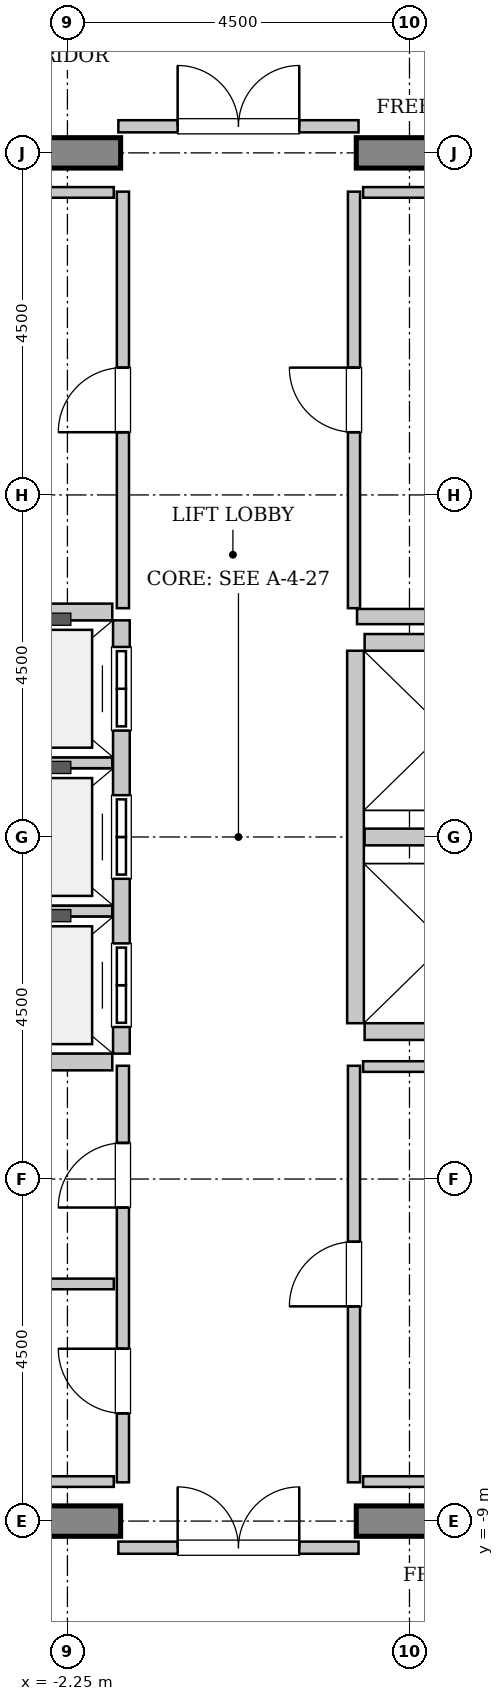
"""IFC4 building model, lengths in metres.
Left out: names, types, materials, properties, quantities, classifications, styles, units other than length and angle.
Written with IfcOpenShell. Run it as: python <this file> out.ifc"""

import sys

from ifc_helpers import new_model, si_unit, direction, frame, frame_2d, origin, place, context, subcontext, project, spatial, rectangle, extrude, source, transform, mapped, element, fill, save


model = new_model("IFC4")
c1 = context("Model", 3, precision=1e-05, world=origin(), true_north=direction((0.0, 1.0)))
c2 = subcontext(c1, "Body", "Model", "MODEL_VIEW")
j1 = project(units=[si_unit("LENGTHUNIT", "METRE"), si_unit("PLANEANGLEUNIT", "RADIAN")], contexts=[c1])
p1 = place(None, origin())
s1 = spatial("IfcSite", under=j1, at=p1, CompositionType="ELEMENT")
p2 = place(p1, origin())
s2 = spatial("IfcBuilding", under=s1, at=p2, CompositionType="ELEMENT")
p3 = place(p2, frame((0.0, 0.0, 322.4)))
s3 = spatial("IfcBuildingStorey", under=s2, at=p3, CompositionType="ELEMENT", Elevation=322.4)
m1 = source(origin(), c2, "Body", "SweptSolid", [
    extrude(rectangle(XDim=9.9, YDim=0.4, at=frame_2d((4.95, 0.0))), origin(), (0.0, 0.0, 1.0), 3.8),
])
for number, where, z_axis, x_axis in (
    (1, (-11.45, 9.0, 0.0), (0.0, 0.0, 1.0), (1.0, 0.0, 0.0)),
    (2, (1.55, 9.0, 0.0), (0.0, 0.0, 1.0), (1.0, 0.0, 0.0)),
    (3, (-11.45, -9.0, 0.0), (0.0, 0.0, 1.0), (1.0, 0.0, 0.0)),
    (4, (1.55, -9.0, 0.0), (0.0, 0.0, 1.0), (1.0, 0.0, 0.0)),
):
    element("IfcWall", number, at=place(p3, frame(where, z_axis=z_axis, x_axis=x_axis)), inside=s3, PredefinedType="SHEAR", context=c2, shape_type="MappedRepresentation", body=[
        mapped(m1, transform((0.0, 0.0, 0.0), x_axis=(1.0, 0.0, 0.0), y_axis=(0.0, 1.0, 0.0), z_axis=(0.0, 0.0, 1.0), scale=1.0)),
    ])
m2 = source(origin(), c2, "Body", "SweptSolid", [
    extrude(rectangle(XDim=5.7, YDim=0.22, at=frame_2d((2.85, 0.0))), origin(), (0.0, 0.0, 1.0), 3.535),
])
p4 = place(p3, frame((-1.54, -2.85, 0.0), z_axis=(0.0, 0.0, 1.0), x_axis=(0.0, 1.0, 0.0)))
e5 = element("IfcWall", 5, at=p4, inside=s3, PredefinedType="SOLIDWALL", context=c2, shape_type="MappedRepresentation", body=[
    mapped(m2, transform((0.0, 0.0, 0.0), x_axis=(1.0, 0.0, 0.0), y_axis=(0.0, 1.0, 0.0), z_axis=(0.0, 0.0, 1.0), scale=1.0)),
])
p5 = place(p4, frame((0.35, 0.0, 0.0)))
e6 = element("IfcOpeningElement", 6, at=p5, cuts=e5, PredefinedType="OPENING", context=c2, shape_type="SweptSolid", body=[
    extrude(rectangle(XDim=1.1, YDim=2.2, at=frame_2d((0.55, 1.1))), frame((0.0, 0.12, 0.0), z_axis=(0.0, -1.0, 0.0), x_axis=(1.0, 0.0, 0.0)), (0.0, 0.0, 1.0), 0.24),
])
p6 = place(p4, frame((2.3, 0.0, 0.0)))
e7 = element("IfcOpeningElement", 7, at=p6, cuts=e5, PredefinedType="OPENING", context=c2, shape_type="SweptSolid", body=[
    extrude(rectangle(XDim=1.1, YDim=2.2, at=frame_2d((0.55, 1.1))), frame((0.0, 0.12, 0.0), z_axis=(0.0, -1.0, 0.0), x_axis=(1.0, 0.0, 0.0)), (0.0, 0.0, 1.0), 0.24),
])
p7 = place(p4, frame((4.25, 0.0, 0.0)))
e8 = element("IfcOpeningElement", 8, at=p7, cuts=e5, PredefinedType="OPENING", context=c2, shape_type="SweptSolid", body=[
    extrude(rectangle(XDim=1.1, YDim=2.2, at=frame_2d((0.55, 1.1))), frame((0.0, 0.12, 0.0), z_axis=(0.0, -1.0, 0.0), x_axis=(1.0, 0.0, 0.0)), (0.0, 0.0, 1.0), 0.24),
])
m3 = source(origin(), c2, "Body", "SweptSolid", [
    extrude(rectangle(XDim=2.13, YDim=0.22, at=frame_2d((1.065, 0.0))), origin(), (0.0, 0.0, 1.0), 3.535),
])
p8 = place(p3, frame((-3.79, -2.96, 0.0), z_axis=(0.0, 0.0, 1.0), x_axis=(1.0, 0.0, 0.0)))
e9 = element("IfcWall", 9, at=p8, inside=s3, PredefinedType="SOLIDWALL", context=c2, shape_type="MappedRepresentation", body=[
    mapped(m3, transform((0.0, 0.0, 0.0), x_axis=(1.0, 0.0, 0.0), y_axis=(0.0, 1.0, 0.0), z_axis=(0.0, 0.0, 1.0), scale=1.0)),
])
m4 = source(origin(), c2, "Body", "SweptSolid", [
    extrude(rectangle(XDim=2.13, YDim=0.14, at=frame_2d((1.065, 0.0))), origin(), (0.0, 0.0, 1.0), 3.535),
])
for number, where, z_axis, x_axis in (
    (10, (-3.79, -0.975, 0.0), (0.0, 0.0, 1.0), (1.0, 0.0, 0.0)),
    (11, (-3.79, 0.975, 0.0), (0.0, 0.0, 1.0), (1.0, 0.0, 0.0)),
):
    element("IfcWall", number, at=place(p3, frame(where, z_axis=z_axis, x_axis=x_axis)), inside=s3, PredefinedType="PARTITIONING", context=c2, shape_type="MappedRepresentation", body=[
        mapped(m4, transform((0.0, 0.0, 0.0), x_axis=(1.0, 0.0, 0.0), y_axis=(0.0, 1.0, 0.0), z_axis=(0.0, 0.0, 1.0), scale=1.0)),
    ])
p9 = place(p3, frame((-1.66, 2.96, 0.0), z_axis=(0.0, 0.0, 1.0), x_axis=(-1.0, 0.0, 0.0)))
e12 = element("IfcWall", 12, at=p9, inside=s3, PredefinedType="SOLIDWALL", context=c2, shape_type="MappedRepresentation", body=[
    mapped(m3, transform((0.0, 0.0, 0.0), x_axis=(1.0, 0.0, 0.0), y_axis=(0.0, 1.0, 0.0), z_axis=(0.0, 0.0, 1.0), scale=1.0)),
])
m5 = source(origin(), c2, "Body", "SweptSolid", [
    extrude(rectangle(XDim=4.9, YDim=0.22, at=frame_2d((2.45, 0.0))), origin(), (0.0, 0.0, 1.0), 3.535),
])
p10 = place(p3, frame((1.54, 2.45, 0.0), z_axis=(0.0, 0.0, 1.0), x_axis=(0.0, -1.0, 0.0)))
e13 = element("IfcWall", 13, at=p10, inside=s3, PredefinedType="SOLIDWALL", context=c2, shape_type="MappedRepresentation", body=[
    mapped(m5, transform((0.0, 0.0, 0.0), x_axis=(1.0, 0.0, 0.0), y_axis=(0.0, 1.0, 0.0), z_axis=(0.0, 0.0, 1.0), scale=1.0)),
])
for number, where, z_axis, x_axis in (
    (14, (1.66, -2.56, 0.0), (0.0, 0.0, 1.0), (1.0, 0.0, 0.0)),
    (15, (1.66, 0.0, 0.0), (0.0, 0.0, 1.0), (1.0, 0.0, 0.0)),
    (16, (3.79, 2.56, 0.0), (0.0, 0.0, 1.0), (-1.0, 0.0, 0.0)),
):
    element("IfcWall", number, at=place(p3, frame(where, z_axis=z_axis, x_axis=x_axis)), inside=s3, PredefinedType="SOLIDWALL", context=c2, shape_type="MappedRepresentation", body=[
        mapped(m3, transform((0.0, 0.0, 0.0), x_axis=(1.0, 0.0, 0.0), y_axis=(0.0, 1.0, 0.0), z_axis=(0.0, 0.0, 1.0), scale=1.0)),
    ])
m6 = source(origin(), c2, "Body", "SweptSolid", [
    extrude(rectangle(XDim=2.52, YDim=0.2, at=frame_2d((1.26, 0.0))), origin(), (0.0, 0.0, 1.0), 3.535),
])
p11 = place(p3, frame((1.56, 2.9, 0.0), z_axis=(0.0, 0.0, 1.0), x_axis=(1.0, 0.0, 0.0)))
e17 = element("IfcWall", 17, at=p11, inside=s3, PredefinedType="PARTITIONING", context=c2, shape_type="MappedRepresentation", body=[
    mapped(m6, transform((0.0, 0.0, 0.0), x_axis=(1.0, 0.0, 0.0), y_axis=(0.0, 1.0, 0.0), z_axis=(0.0, 0.0, 1.0), scale=1.0)),
])
m7 = source(origin(), c2, "Body", "SweptSolid", [
    extrude(rectangle(XDim=3.16, YDim=0.16, at=frame_2d((1.58, 0.0))), origin(), (0.0, 0.0, 1.0), 2.625),
])
p12 = place(p3, frame((-1.58, 9.35, 0.0), z_axis=(0.0, 0.0, 1.0), x_axis=(1.0, 0.0, 0.0)))
e18 = element("IfcWall", 18, at=p12, inside=s3, PredefinedType="PARTITIONING", context=c2, shape_type="MappedRepresentation", body=[
    mapped(m7, transform((0.0, 0.0, 0.0), x_axis=(1.0, 0.0, 0.0), y_axis=(0.0, 1.0, 0.0), z_axis=(0.0, 0.0, 1.0), scale=1.0)),
])
p13 = place(p12, frame((0.78, 0.0, 0.0)))
e19 = element("IfcOpeningElement", 19, at=p13, cuts=e18, PredefinedType="OPENING", context=c2, shape_type="SweptSolid", body=[
    extrude(rectangle(XDim=1.6, YDim=2.3, at=frame_2d((0.8, 1.15))), frame((0.0, 0.09, 0.0), z_axis=(0.0, -1.0, 0.0), x_axis=(1.0, 0.0, 0.0)), (0.0, 0.0, 1.0), 0.18),
])
p14 = place(p3, frame((-1.58, -9.35, 0.0), z_axis=(0.0, 0.0, 1.0), x_axis=(1.0, 0.0, 0.0)))
e20 = element("IfcWall", 20, at=p14, inside=s3, PredefinedType="PARTITIONING", context=c2, shape_type="MappedRepresentation", body=[
    mapped(m7, transform((0.0, 0.0, 0.0), x_axis=(1.0, 0.0, 0.0), y_axis=(0.0, 1.0, 0.0), z_axis=(0.0, 0.0, 1.0), scale=1.0)),
])
p15 = place(p14, frame((0.78, 0.0, 0.0)))
e21 = element("IfcOpeningElement", 21, at=p15, cuts=e20, PredefinedType="OPENING", context=c2, shape_type="SweptSolid", body=[
    extrude(rectangle(XDim=1.6, YDim=2.3, at=frame_2d((0.8, 1.15))), frame((0.0, 0.09, 0.0), z_axis=(0.0, -1.0, 0.0), x_axis=(1.0, 0.0, 0.0)), (0.0, 0.0, 1.0), 0.18),
])
m8 = source(origin(), c2, "Body", "SweptSolid", [
    extrude(rectangle(XDim=5.48, YDim=0.16, at=frame_2d((2.74, 0.0))), origin(), (0.0, 0.0, 1.0), 3.535),
])
p16 = place(p3, frame((-1.52, 3.01, 0.0), z_axis=(0.0, 0.0, 1.0), x_axis=(0.0, 1.0, 0.0)))
e22 = element("IfcWall", 22, at=p16, inside=s3, PredefinedType="PARTITIONING", context=c2, shape_type="MappedRepresentation", body=[
    mapped(m8, transform((0.0, 0.0, 0.0), x_axis=(1.0, 0.0, 0.0), y_axis=(0.0, 1.0, 0.0), z_axis=(0.0, 0.0, 1.0), scale=1.0)),
])
p17 = place(p16, frame((2.315, 0.0, 0.0)))
e23 = element("IfcOpeningElement", 23, at=p17, cuts=e22, PredefinedType="OPENING", context=c2, shape_type="SweptSolid", body=[
    extrude(rectangle(XDim=0.85, YDim=2.1, at=frame_2d((0.425, 1.05))), frame((0.0, 0.09, 0.0), z_axis=(0.0, -1.0, 0.0), x_axis=(1.0, 0.0, 0.0)), (0.0, 0.0, 1.0), 0.18),
])
m9 = source(origin(), c2, "Body", "SweptSolid", [
    extrude(rectangle(XDim=3.15, YDim=0.14, at=frame_2d((1.575, 0.0))), origin(), (0.0, 0.0, 1.0), 3.535),
])
p18 = place(p3, frame((-4.79, 8.48, 0.0), z_axis=(0.0, 0.0, 1.0), x_axis=(1.0, 0.0, 0.0)))
e24 = element("IfcWall", 24, at=p18, inside=s3, PredefinedType="PARTITIONING", context=c2, shape_type="MappedRepresentation", body=[
    mapped(m9, transform((0.0, 0.0, 0.0), x_axis=(1.0, 0.0, 0.0), y_axis=(0.0, 1.0, 0.0), z_axis=(0.0, 0.0, 1.0), scale=1.0)),
])
p19 = place(p3, frame((-1.52, -8.49, 0.0), z_axis=(0.0, 0.0, 1.0), x_axis=(0.0, 1.0, 0.0)))
e25 = element("IfcWall", 25, at=p19, inside=s3, PredefinedType="PARTITIONING", context=c2, shape_type="MappedRepresentation", body=[
    mapped(m8, transform((0.0, 0.0, 0.0), x_axis=(1.0, 0.0, 0.0), y_axis=(0.0, 1.0, 0.0), z_axis=(0.0, 0.0, 1.0), scale=1.0)),
])
p20 = place(p19, frame((0.907, 0.0, 0.0)))
e26 = element("IfcOpeningElement", 26, at=p20, cuts=e25, PredefinedType="OPENING", context=c2, shape_type="SweptSolid", body=[
    extrude(rectangle(XDim=0.85, YDim=2.1, at=frame_2d((0.425, 1.05))), frame((0.0, 0.09, 0.0), z_axis=(0.0, -1.0, 0.0), x_axis=(1.0, 0.0, 0.0)), (0.0, 0.0, 1.0), 0.18),
])
p21 = place(p19, frame((3.615, 0.0, 0.0)))
e27 = element("IfcOpeningElement", 27, at=p21, cuts=e25, PredefinedType="OPENING", context=c2, shape_type="SweptSolid", body=[
    extrude(rectangle(XDim=0.85, YDim=2.1, at=frame_2d((0.425, 1.05))), frame((0.0, 0.09, 0.0), z_axis=(0.0, -1.0, 0.0), x_axis=(1.0, 0.0, 0.0)), (0.0, 0.0, 1.0), 0.18),
])
m10 = source(origin(), c2, "Body", "SweptSolid", [
    extrude(rectangle(XDim=5.55, YDim=0.14, at=frame_2d((2.775, 0.0))), origin(), (0.0, 0.0, 1.0), 3.535),
])
p22 = place(p3, frame((-7.19, -5.88, 0.0), z_axis=(0.0, 0.0, 1.0), x_axis=(1.0, 0.0, 0.0)))
e28 = element("IfcWall", 28, at=p22, inside=s3, PredefinedType="PARTITIONING", context=c2, shape_type="MappedRepresentation", body=[
    mapped(m10, transform((0.0, 0.0, 0.0), x_axis=(1.0, 0.0, 0.0), y_axis=(0.0, 1.0, 0.0), z_axis=(0.0, 0.0, 1.0), scale=1.0)),
])
p23 = place(p3, frame((1.52, 3.01, 0.0), z_axis=(0.0, 0.0, 1.0), x_axis=(0.0, 1.0, 0.0)))
e29 = element("IfcWall", 29, at=p23, inside=s3, PredefinedType="PARTITIONING", context=c2, shape_type="MappedRepresentation", body=[
    mapped(m8, transform((0.0, 0.0, 0.0), x_axis=(1.0, 0.0, 0.0), y_axis=(0.0, 1.0, 0.0), z_axis=(0.0, 0.0, 1.0), scale=1.0)),
])
p24 = place(p23, frame((2.315, 0.0, 0.0)))
e30 = element("IfcOpeningElement", 30, at=p24, cuts=e29, PredefinedType="OPENING", context=c2, shape_type="SweptSolid", body=[
    extrude(rectangle(XDim=0.85, YDim=2.1, at=frame_2d((0.425, 1.05))), frame((0.0, 0.09, 0.0), z_axis=(0.0, -1.0, 0.0), x_axis=(1.0, 0.0, 0.0)), (0.0, 0.0, 1.0), 0.18),
])
for number, where, z_axis, x_axis in (
    (31, (1.64, 8.48, 0.0), (0.0, 0.0, 1.0), (1.0, 0.0, 0.0)),
    (32, (-4.79, -8.48, 0.0), (0.0, 0.0, 1.0), (1.0, 0.0, 0.0)),
):
    element("IfcWall", number, at=place(p3, frame(where, z_axis=z_axis, x_axis=x_axis)), inside=s3, PredefinedType="PARTITIONING", context=c2, shape_type="MappedRepresentation", body=[
        mapped(m9, transform((0.0, 0.0, 0.0), x_axis=(1.0, 0.0, 0.0), y_axis=(0.0, 1.0, 0.0), z_axis=(0.0, 0.0, 1.0), scale=1.0)),
    ])
p25 = place(p3, frame((1.52, -8.49, 0.0), z_axis=(0.0, 0.0, 1.0), x_axis=(0.0, 1.0, 0.0)))
e33 = element("IfcWall", 33, at=p25, inside=s3, PredefinedType="PARTITIONING", context=c2, shape_type="MappedRepresentation", body=[
    mapped(m8, transform((0.0, 0.0, 0.0), x_axis=(1.0, 0.0, 0.0), y_axis=(0.0, 1.0, 0.0), z_axis=(0.0, 0.0, 1.0), scale=1.0)),
])
p26 = place(p25, frame((2.315, 0.0, 0.0)))
e34 = element("IfcOpeningElement", 34, at=p26, cuts=e33, PredefinedType="OPENING", context=c2, shape_type="SweptSolid", body=[
    extrude(rectangle(XDim=0.85, YDim=2.1, at=frame_2d((0.425, 1.05))), frame((0.0, 0.09, 0.0), z_axis=(0.0, -1.0, 0.0), x_axis=(1.0, 0.0, 0.0)), (0.0, 0.0, 1.0), 0.18),
])
for number, where, z_axis, x_axis in (
    (35, (1.64, -3.02, 0.0), (0.0, 0.0, 1.0), (1.0, 0.0, 0.0)),
    (36, (1.64, -8.48, 0.0), (0.0, 0.0, 1.0), (1.0, 0.0, 0.0)),
):
    element("IfcWall", number, at=place(p3, frame(where, z_axis=z_axis, x_axis=x_axis)), inside=s3, PredefinedType="PARTITIONING", context=c2, shape_type="MappedRepresentation", body=[
        mapped(m9, transform((0.0, 0.0, 0.0), x_axis=(1.0, 0.0, 0.0), y_axis=(0.0, 1.0, 0.0), z_axis=(0.0, 0.0, 1.0), scale=1.0)),
    ])
m11 = source(origin(), c2, "Body", "SweptSolid", [
    extrude(rectangle(XDim=1.1, YDim=2.2, at=frame_2d((0.55, 1.1))), frame((0.0, 0.025, 0.0), z_axis=(0.0, -1.0, 0.0), x_axis=(1.0, 0.0, 0.0)), (0.0, 0.0, 1.0), 0.05),
])
p27 = place(p5, origin())
e37 = element("IfcDoor", 37, at=p27, inside=s3, OperationType="DOUBLE_DOOR_SLIDING", PredefinedType="DOOR", context=c2, shape_type="MappedRepresentation", body=[
    mapped(m11, transform((0.0, 0.0, 0.0), x_axis=(1.0, 0.0, 0.0), y_axis=(0.0, 1.0, 0.0), z_axis=(0.0, 0.0, 1.0), scale=1.0)),
])
fill(e6, e37)
p28 = place(p6, origin())
e38 = element("IfcDoor", 38, at=p28, inside=s3, OperationType="DOUBLE_DOOR_SLIDING", PredefinedType="DOOR", context=c2, shape_type="MappedRepresentation", body=[
    mapped(m11, transform((0.0, 0.0, 0.0), x_axis=(1.0, 0.0, 0.0), y_axis=(0.0, 1.0, 0.0), z_axis=(0.0, 0.0, 1.0), scale=1.0)),
])
fill(e7, e38)
p29 = place(p7, origin())
e39 = element("IfcDoor", 39, at=p29, inside=s3, OperationType="DOUBLE_DOOR_SLIDING", PredefinedType="DOOR", context=c2, shape_type="MappedRepresentation", body=[
    mapped(m11, transform((0.0, 0.0, 0.0), x_axis=(1.0, 0.0, 0.0), y_axis=(0.0, 1.0, 0.0), z_axis=(0.0, 0.0, 1.0), scale=1.0)),
])
fill(e8, e39)
m12 = source(origin(), c2, "Body", "SweptSolid", [
    extrude(rectangle(XDim=1.6, YDim=2.3, at=frame_2d((0.8, 1.15))), frame((0.0, 0.025, 0.0), z_axis=(0.0, -1.0, 0.0), x_axis=(1.0, 0.0, 0.0)), (0.0, 0.0, 1.0), 0.05),
])
p30 = place(p13, origin())
e40 = element("IfcDoor", 40, at=p30, inside=s3, OperationType="DOUBLE_DOOR_SINGLE_SWING", PredefinedType="DOOR", context=c2, shape_type="MappedRepresentation", body=[
    mapped(m12, transform((0.0, 0.0, 0.0), x_axis=(1.0, 0.0, 0.0), y_axis=(0.0, 1.0, 0.0), z_axis=(0.0, 0.0, 1.0), scale=1.0)),
])
fill(e19, e40)
p31 = place(p15, origin())
e41 = element("IfcDoor", 41, at=p31, inside=s3, OperationType="DOUBLE_DOOR_SINGLE_SWING", PredefinedType="DOOR", context=c2, shape_type="MappedRepresentation", body=[
    mapped(m12, transform((0.0, 0.0, 0.0), x_axis=(1.0, 0.0, 0.0), y_axis=(0.0, 1.0, 0.0), z_axis=(0.0, 0.0, 1.0), scale=1.0)),
])
fill(e21, e41)
m13 = source(origin(), c2, "Body", "SweptSolid", [
    extrude(rectangle(XDim=0.85, YDim=2.1, at=frame_2d((0.425, 1.05))), frame((0.0, 0.025, 0.0), z_axis=(0.0, -1.0, 0.0), x_axis=(1.0, 0.0, 0.0)), (0.0, 0.0, 1.0), 0.05),
])
p32 = place(p17, origin())
e42 = element("IfcDoor", 42, at=p32, inside=s3, OperationType="SINGLE_SWING_LEFT", PredefinedType="DOOR", context=c2, shape_type="MappedRepresentation", body=[
    mapped(m13, transform((0.0, 0.0, 0.0), x_axis=(1.0, 0.0, 0.0), y_axis=(0.0, 1.0, 0.0), z_axis=(0.0, 0.0, 1.0), scale=1.0)),
])
fill(e23, e42)
p33 = place(p20, origin())
e43 = element("IfcDoor", 43, at=p33, inside=s3, OperationType="SINGLE_SWING_RIGHT", PredefinedType="DOOR", context=c2, shape_type="MappedRepresentation", body=[
    mapped(m13, transform((0.0, 0.0, 0.0), x_axis=(1.0, 0.0, 0.0), y_axis=(0.0, 1.0, 0.0), z_axis=(0.0, 0.0, 1.0), scale=1.0)),
])
fill(e26, e43)
p34 = place(p21, origin())
e44 = element("IfcDoor", 44, at=p34, inside=s3, OperationType="SINGLE_SWING_LEFT", PredefinedType="DOOR", context=c2, shape_type="MappedRepresentation", body=[
    mapped(m13, transform((0.0, 0.0, 0.0), x_axis=(1.0, 0.0, 0.0), y_axis=(0.0, 1.0, 0.0), z_axis=(0.0, 0.0, 1.0), scale=1.0)),
])
fill(e27, e44)
p35 = place(p24, origin())
e45 = element("IfcDoor", 45, at=p35, inside=s3, OperationType="SINGLE_SWING_RIGHT", PredefinedType="DOOR", context=c2, shape_type="MappedRepresentation", body=[
    mapped(m13, transform((0.0, 0.0, 0.0), x_axis=(1.0, 0.0, 0.0), y_axis=(0.0, 1.0, 0.0), z_axis=(0.0, 0.0, 1.0), scale=1.0)),
])
fill(e30, e45)
p36 = place(p26, origin())
e46 = element("IfcDoor", 46, at=p36, inside=s3, OperationType="SINGLE_SWING_LEFT", PredefinedType="DOOR", context=c2, shape_type="MappedRepresentation", body=[
    mapped(m13, transform((0.0, 0.0, 0.0), x_axis=(1.0, 0.0, 0.0), y_axis=(0.0, 1.0, 0.0), z_axis=(0.0, 0.0, 1.0), scale=1.0)),
])
fill(e34, e46)
save(model, sys.argv[1])
